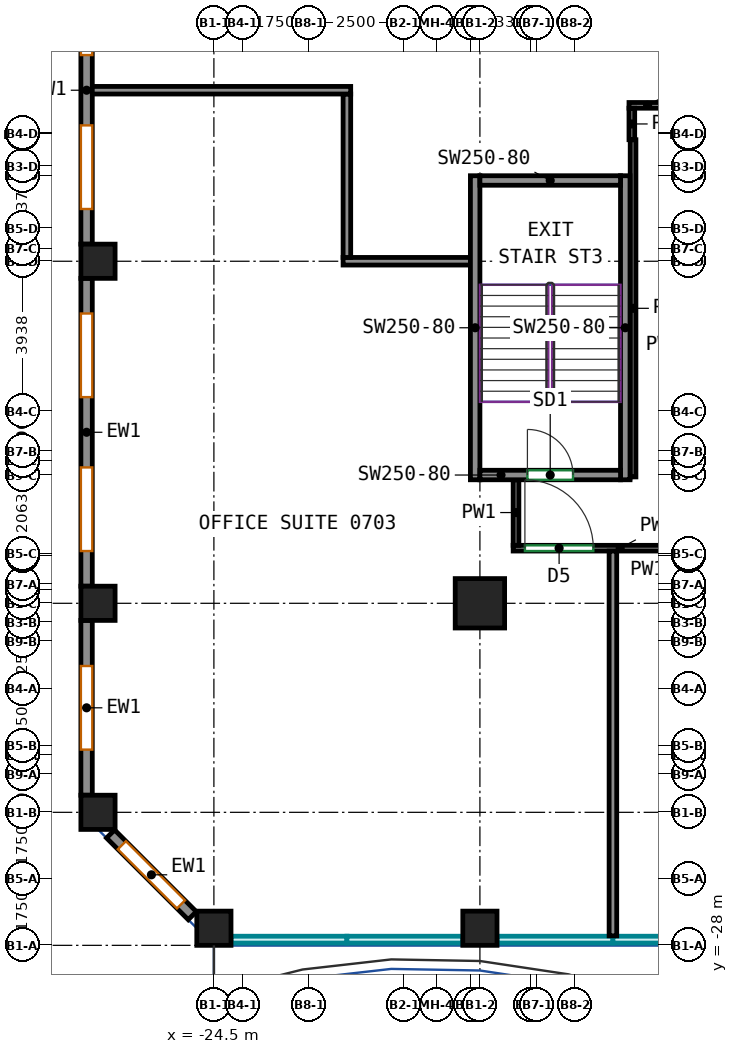
"""IFC4 building model, lengths in metres.
Left out: names, types, materials, properties, quantities, classifications, styles, units other than length and angle.
Written with IfcOpenShell. Run it as: python <this file> out.ifc"""

import sys

from ifc_helpers import new_model, si_unit, direction, frame, frame_2d, origin, origin_2d, place, context, subcontext, project, spatial, rectangle, extrude, source, transform, mapped, element, fill, save


model = new_model("IFC4")
c1 = context("Model", 3, precision=1e-05, world=origin(), true_north=direction((0.0, 1.0)))
c2 = subcontext(c1, "Body", "Model", "MODEL_VIEW")
j1 = project(units=[si_unit("LENGTHUNIT", "METRE"), si_unit("PLANEANGLEUNIT", "RADIAN")], contexts=[c1])
p1 = place(None, origin())
s1 = spatial("IfcSite", under=j1, at=p1, CompositionType="ELEMENT")
p2 = place(p1, origin())
s2 = spatial("IfcBuilding", under=s1, at=p2, CompositionType="ELEMENT")
p3 = place(p2, frame((0.0, 0.0, 35.0)))
s3 = spatial("IfcBuildingStorey", under=s2, at=p3, CompositionType="ELEMENT", Elevation=35.0)
m1 = source(origin(), c2, "Body", "SweptSolid", [
    extrude(rectangle(XDim=0.9, YDim=0.9, at=origin_2d()), origin(), (0.0, 0.0, 1.0), 3.72),
])
for number, where, z_axis, x_axis in (
    (1, (-27.55, -24.5, 0.0), (0.0, 0.0, 1.0), (1.0, 0.0, 0.0)),
    (2, (-27.55, -19.0, 0.0), (0.0, 0.0, 1.0), (1.0, 0.0, 0.0)),
    (3, (-27.55, -10.0, 0.0), (0.0, 0.0, 1.0), (1.0, 0.0, 0.0)),
    (4, (-24.5, -27.55, 0.0), (0.0, 0.0, 1.0), (1.0, 0.0, 0.0)),
    (5, (-17.5, -27.55, 0.0), (0.0, 0.0, 1.0), (1.0, 0.0, 0.0)),
):
    element("IfcColumn", number, at=place(p3, frame(where, z_axis=z_axis, x_axis=x_axis)), inside=s3, PredefinedType="COLUMN", context=c2, shape_type="MappedRepresentation", body=[
        mapped(m1, transform((0.0, 0.0, 0.0))),
    ])
m2 = source(origin(), c2, "Body", "SweptSolid", [
    extrude(rectangle(XDim=1.3, YDim=1.3, at=origin_2d()), origin(), (0.0, 0.0, 1.0), 3.72),
])
p4 = place(p3, frame((-17.5, -19.0, 0.0), z_axis=(0.0, 0.0, 1.0), x_axis=(1.0, 0.0, 0.0)))
e6 = element("IfcColumn", 6, at=p4, inside=s3, PredefinedType="COLUMN", context=c2, shape_type="MappedRepresentation", body=[
    mapped(m2, transform((0.0, 0.0, 0.0))),
])
m3 = source(origin(), c2, "Body", "SweptSolid", [
    extrude(rectangle(XDim=8.0, YDim=0.25, at=frame_2d((4.0, 0.0))), origin(), (0.0, 0.0, 1.0), 3.72),
])
for number, where, z_axis, x_axis in (
    (7, (-17.625, -15.75, 0.0), (0.0, 0.0, 1.0), (0.0, 1.0, 0.0)),
    (8, (-13.675, -15.75, 0.0), (0.0, 0.0, 1.0), (0.0, 1.0, 0.0)),
):
    element("IfcWall", number, at=place(p3, frame(where, z_axis=z_axis, x_axis=x_axis)), inside=s3, PredefinedType="SHEAR", context=c2, shape_type="MappedRepresentation", body=[
        mapped(m3, transform((0.0, 0.0, 0.0))),
    ])
m4 = source(origin(), c2, "Body", "SweptSolid", [
    extrude(rectangle(XDim=3.7, YDim=0.25, at=frame_2d((1.85, 0.0))), origin(), (0.0, 0.0, 1.0), 3.72),
])
p5 = place(p3, frame((-17.5, -15.625, 0.0), z_axis=(0.0, 0.0, 1.0), x_axis=(1.0, 0.0, 0.0)))
e9 = element("IfcWall", 9, at=p5, inside=s3, PredefinedType="SHEAR", context=c2, shape_type="MappedRepresentation", body=[
    mapped(m4, transform((0.0, 0.0, 0.0))),
])
p6 = place(p5, frame((1.25, 0.0, 0.0)))
e10 = element("IfcOpeningElement", 10, at=p6, cuts=e9, PredefinedType="OPENING", context=c2, shape_type="SweptSolid", body=[
    extrude(rectangle(XDim=1.2, YDim=2.1, at=frame_2d((0.6, 1.05))), frame((0.0, 0.135, 0.0), z_axis=(0.0, -1.0, 0.0), x_axis=(1.0, 0.0, 0.0)), (0.0, 0.0, 1.0), 0.27),
])
p7 = place(p3, frame((-17.5, -7.875, 0.0), z_axis=(0.0, 0.0, 1.0), x_axis=(1.0, 0.0, 0.0)))
e11 = element("IfcWall", 11, at=p7, inside=s3, PredefinedType="SHEAR", context=c2, shape_type="MappedRepresentation", body=[
    mapped(m4, transform((0.0, 0.0, 0.0))),
])
m5 = source(origin(), c2, "Body", "SweptSolid", [
    extrude(rectangle(XDim=8.1, YDim=0.3, at=frame_2d((4.05, 0.0))), origin(), (0.0, 0.0, 1.0), 3.72),
])
p8 = place(p3, frame((-27.85, -1.45, 0.0), z_axis=(0.0, 0.0, 1.0), x_axis=(0.0, -1.0, 0.0)))
e12 = element("IfcWall", 12, at=p8, inside=s3, PredefinedType="SOLIDWALL", context=c2, shape_type="MappedRepresentation", body=[
    mapped(m5, transform((0.0, 0.0, 0.0))),
])
p9 = place(p8, frame((0.925, 0.0, 0.7)))
e13 = element("IfcOpeningElement", 13, at=p9, cuts=e12, PredefinedType="OPENING", context=c2, shape_type="SweptSolid", body=[
    extrude(rectangle(XDim=2.2, YDim=2.25, at=frame_2d((1.1, 1.125))), frame((0.0, 0.16, 0.0), z_axis=(0.0, -1.0, 0.0), x_axis=(1.0, 0.0, 0.0)), (0.0, 0.0, 1.0), 0.32),
])
p10 = place(p8, frame((4.975, 0.0, 0.7)))
e14 = element("IfcOpeningElement", 14, at=p10, cuts=e12, PredefinedType="OPENING", context=c2, shape_type="SweptSolid", body=[
    extrude(rectangle(XDim=2.2, YDim=2.25, at=frame_2d((1.1, 1.125))), frame((0.0, 0.16, 0.0), z_axis=(0.0, -1.0, 0.0), x_axis=(1.0, 0.0, 0.0)), (0.0, 0.0, 1.0), 0.32),
])
p11 = place(p3, frame((-27.85, -10.45, 0.0), z_axis=(0.0, 0.0, 1.0), x_axis=(0.0, -1.0, 0.0)))
e15 = element("IfcWall", 15, at=p11, inside=s3, PredefinedType="SOLIDWALL", context=c2, shape_type="MappedRepresentation", body=[
    mapped(m5, transform((0.0, 0.0, 0.0))),
])
p12 = place(p11, frame((0.925, 0.0, 0.7)))
e16 = element("IfcOpeningElement", 16, at=p12, cuts=e15, PredefinedType="OPENING", context=c2, shape_type="SweptSolid", body=[
    extrude(rectangle(XDim=2.2, YDim=2.25, at=frame_2d((1.1, 1.125))), frame((0.0, 0.16, 0.0), z_axis=(0.0, -1.0, 0.0), x_axis=(1.0, 0.0, 0.0)), (0.0, 0.0, 1.0), 0.32),
])
p13 = place(p11, frame((4.975, 0.0, 0.7)))
e17 = element("IfcOpeningElement", 17, at=p13, cuts=e15, PredefinedType="OPENING", context=c2, shape_type="SweptSolid", body=[
    extrude(rectangle(XDim=2.2, YDim=2.25, at=frame_2d((1.1, 1.125))), frame((0.0, 0.16, 0.0), z_axis=(0.0, -1.0, 0.0), x_axis=(1.0, 0.0, 0.0)), (0.0, 0.0, 1.0), 0.32),
])
m6 = source(origin(), c2, "Body", "SweptSolid", [
    extrude(rectangle(XDim=4.6, YDim=0.3, at=frame_2d((2.3, 0.0))), origin(), (0.0, 0.0, 1.0), 3.72),
])
p14 = place(p3, frame((-27.85, -19.45, 0.0), z_axis=(0.0, 0.0, 1.0), x_axis=(0.0, -1.0, 0.0)))
e18 = element("IfcWall", 18, at=p14, inside=s3, PredefinedType="SOLIDWALL", context=c2, shape_type="MappedRepresentation", body=[
    mapped(m6, transform((0.0, 0.0, 0.0))),
])
p15 = place(p14, frame((1.2, 0.0, 0.7)))
e19 = element("IfcOpeningElement", 19, at=p15, cuts=e18, PredefinedType="OPENING", context=c2, shape_type="SweptSolid", body=[
    extrude(rectangle(XDim=2.2, YDim=2.25, at=frame_2d((1.1, 1.125))), frame((0.0, 0.16, 0.0), z_axis=(0.0, -1.0, 0.0), x_axis=(1.0, 0.0, 0.0)), (0.0, 0.0, 1.0), 0.32),
])
m7 = source(origin(), c2, "Body", "SweptSolid", [
    extrude(rectangle(XDim=3.041, YDim=0.3, at=frame_2d((1.521, 0.0))), origin(), (0.0, 0.0, 1.0), 3.72),
])
p16 = place(p3, frame((-27.219, -25.069, 0.0), z_axis=(0.0, 0.0, 1.0), x_axis=(0.707106781187, -0.707106781187, 0.0)))
e20 = element("IfcWall", 20, at=p16, inside=s3, PredefinedType="SOLIDWALL", context=c2, shape_type="MappedRepresentation", body=[
    mapped(m7, transform((0.0, 0.0, 0.0))),
])
p17 = place(p16, frame((0.42, 0.0, 0.7)))
e21 = element("IfcOpeningElement", 21, at=p17, cuts=e20, PredefinedType="OPENING", context=c2, shape_type="SweptSolid", body=[
    extrude(rectangle(XDim=2.2, YDim=2.25, at=frame_2d((1.1, 1.125))), frame((0.0, 0.16, 0.0), z_axis=(0.0, -1.0, 0.0), x_axis=(1.0, 0.0, 0.0)), (0.0, 0.0, 1.0), 0.32),
])
p18 = place(p3, frame((-12.598, -5.898, 0.0), z_axis=(0.0, 0.0, 1.0), x_axis=(-1.0, 0.0, 0.0)))
e22 = element("IfcWall", 22, at=p18, inside=s3, PredefinedType="PARTITIONING", context=c2, shape_type="SweptSolid", body=[
    extrude(rectangle(XDim=0.979, YDim=0.15, at=frame_2d((0.49, 0.0))), origin(), (0.0, 0.0, 1.0), 3.72),
])
p19 = place(p3, frame((-13.47, -6.802, 0.0), z_axis=(0.0, 0.0, 1.0), x_axis=(0.0, -1.0, 0.0)))
e23 = element("IfcWall", 23, at=p19, inside=s3, PredefinedType="PARTITIONING", context=c2, shape_type="SweptSolid", body=[
    extrude(rectangle(XDim=8.873, YDim=0.15, at=frame_2d((4.437, 0.0))), origin(), (0.0, 0.0, 1.0), 3.72),
])
p20 = place(p3, frame((-13.502, -5.973, 0.0), z_axis=(0.0, 0.0, 1.0), x_axis=(0.0, -1.0, 0.0)))
e24 = element("IfcWall", 24, at=p20, inside=s3, PredefinedType="PARTITIONING", context=c2, shape_type="SweptSolid", body=[
    extrude(rectangle(XDim=0.829, YDim=0.15, at=frame_2d((0.415, 0.0))), origin(), (0.0, 0.0, 1.0), 3.72),
])
p21 = place(p3, frame((-16.625, -17.55, 0.0), z_axis=(0.0, 0.0, 1.0), x_axis=(1.0, 0.0, 0.0)))
e25 = element("IfcWall", 25, at=p21, inside=s3, PredefinedType="PARTITIONING", context=c2, shape_type="SweptSolid", body=[
    extrude(rectangle(XDim=4.023, YDim=0.15, at=frame_2d((2.011, 0.0))), origin(), (0.0, 0.0, 1.0), 3.72),
])
p22 = place(p21, frame((0.309, 0.0, 0.0)))
e26 = element("IfcOpeningElement", 26, at=p22, cuts=e25, PredefinedType="OPENING", context=c2, shape_type="SweptSolid", body=[
    extrude(rectangle(XDim=1.8, YDim=2.1, at=frame_2d((0.9, 1.05))), frame((0.0, 0.085, 0.0), z_axis=(0.0, -1.0, 0.0), x_axis=(1.0, 0.0, 0.0)), (0.0, 0.0, 1.0), 0.17),
])
p23 = place(p3, frame((-16.55, -15.75, 0.0), z_axis=(0.0, 0.0, 1.0), x_axis=(0.0, -1.0, 0.0)))
e27 = element("IfcWall", 27, at=p23, inside=s3, PredefinedType="PARTITIONING", context=c2, shape_type="SweptSolid", body=[
    extrude(rectangle(XDim=1.725, YDim=0.15, at=frame_2d((0.863, 0.0))), origin(), (0.0, 0.0, 1.0), 3.72),
])
p24 = place(p3, frame((-21.1, -10.0, 0.0), z_axis=(0.0, 0.0, 1.0), x_axis=(1.0, 0.0, 0.0)))
e28 = element("IfcWall", 28, at=p24, inside=s3, PredefinedType="PARTITIONING", context=c2, shape_type="SweptSolid", body=[
    extrude(rectangle(XDim=3.35, YDim=0.2, at=frame_2d((1.675, 0.0))), origin(), (0.0, 0.0, 1.0), 3.72),
])
p25 = place(p3, frame((-21.0, -9.9, 0.0), z_axis=(0.0, 0.0, 1.0), x_axis=(0.0, 1.0, 0.0)))
e29 = element("IfcWall", 29, at=p25, inside=s3, PredefinedType="PARTITIONING", context=c2, shape_type="SweptSolid", body=[
    extrude(rectangle(XDim=4.3, YDim=0.2, at=frame_2d((2.15, 0.0))), origin(), (0.0, 0.0, 1.0), 3.72),
])
p26 = place(p3, frame((-27.75, -5.5, 0.0), z_axis=(0.0, 0.0, 1.0), x_axis=(1.0, 0.0, 0.0)))
e30 = element("IfcWall", 30, at=p26, inside=s3, PredefinedType="PARTITIONING", context=c2, shape_type="SweptSolid", body=[
    extrude(rectangle(XDim=6.85, YDim=0.2, at=frame_2d((3.425, 0.0))), origin(), (0.0, 0.0, 1.0), 3.72),
])
p27 = place(p3, frame((-14.0, -27.75, 0.0), z_axis=(0.0, 0.0, 1.0), x_axis=(0.0, 1.0, 0.0)))
e31 = element("IfcWall", 31, at=p27, inside=s3, PredefinedType="PARTITIONING", context=c2, shape_type="SweptSolid", body=[
    extrude(rectangle(XDim=10.124, YDim=0.2, at=frame_2d((5.062, 0.0))), origin(), (0.0, 0.0, 1.0), 3.72),
])
p28 = place(p9, origin())
e32 = element("IfcWindow", 32, at=p28, inside=s3, PartitioningType="SINGLE_PANEL", PredefinedType="WINDOW", context=c2, shape_type="SweptSolid", body=[
    extrude(rectangle(XDim=2.2, YDim=2.25, at=frame_2d((1.1, 1.125))), frame((0.0, 0.03, 0.0), z_axis=(0.0, -1.0, 0.0), x_axis=(1.0, 0.0, 0.0)), (0.0, 0.0, 1.0), 0.06),
])
fill(e13, e32)
p29 = place(p10, origin())
e33 = element("IfcWindow", 33, at=p29, inside=s3, PartitioningType="SINGLE_PANEL", PredefinedType="WINDOW", context=c2, shape_type="SweptSolid", body=[
    extrude(rectangle(XDim=2.2, YDim=2.25, at=frame_2d((1.1, 1.125))), frame((0.0, 0.03, 0.0), z_axis=(0.0, -1.0, 0.0), x_axis=(1.0, 0.0, 0.0)), (0.0, 0.0, 1.0), 0.06),
])
fill(e14, e33)
p30 = place(p12, origin())
e34 = element("IfcWindow", 34, at=p30, inside=s3, PartitioningType="SINGLE_PANEL", PredefinedType="WINDOW", context=c2, shape_type="SweptSolid", body=[
    extrude(rectangle(XDim=2.2, YDim=2.25, at=frame_2d((1.1, 1.125))), frame((0.0, 0.03, 0.0), z_axis=(0.0, -1.0, 0.0), x_axis=(1.0, 0.0, 0.0)), (0.0, 0.0, 1.0), 0.06),
])
fill(e16, e34)
p31 = place(p13, origin())
e35 = element("IfcWindow", 35, at=p31, inside=s3, PartitioningType="SINGLE_PANEL", PredefinedType="WINDOW", context=c2, shape_type="SweptSolid", body=[
    extrude(rectangle(XDim=2.2, YDim=2.25, at=frame_2d((1.1, 1.125))), frame((0.0, 0.03, 0.0), z_axis=(0.0, -1.0, 0.0), x_axis=(1.0, 0.0, 0.0)), (0.0, 0.0, 1.0), 0.06),
])
fill(e17, e35)
p32 = place(p15, origin())
e36 = element("IfcWindow", 36, at=p32, inside=s3, PartitioningType="SINGLE_PANEL", PredefinedType="WINDOW", context=c2, shape_type="SweptSolid", body=[
    extrude(rectangle(XDim=2.2, YDim=2.25, at=frame_2d((1.1, 1.125))), frame((0.0, 0.03, 0.0), z_axis=(0.0, -1.0, 0.0), x_axis=(1.0, 0.0, 0.0)), (0.0, 0.0, 1.0), 0.06),
])
fill(e19, e36)
p33 = place(p17, origin())
e37 = element("IfcWindow", 37, at=p33, inside=s3, PartitioningType="SINGLE_PANEL", PredefinedType="WINDOW", context=c2, shape_type="SweptSolid", body=[
    extrude(rectangle(XDim=2.2, YDim=2.25, at=frame_2d((1.1, 1.125))), frame((0.0, 0.03, 0.0), z_axis=(0.0, -1.0, 0.0), x_axis=(1.0, 0.0, 0.0)), (0.0, 0.0, 1.0), 0.06),
])
fill(e21, e37)
p34 = place(p6, origin())
e38 = element("IfcDoor", 38, at=p34, inside=s3, OperationType="DOUBLE_DOOR_SINGLE_SWING", PredefinedType="DOOR", context=c2, shape_type="SweptSolid", body=[
    extrude(rectangle(XDim=1.2, YDim=2.1, at=frame_2d((0.6, 1.05))), frame((0.0, 0.025, 0.0), z_axis=(0.0, -1.0, 0.0), x_axis=(1.0, 0.0, 0.0)), (0.0, 0.0, 1.0), 0.05),
])
fill(e10, e38)
p35 = place(p22, origin())
e39 = element("IfcDoor", 39, at=p35, inside=s3, OperationType="DOUBLE_DOOR_SINGLE_SWING", PredefinedType="DOOR", context=c2, shape_type="SweptSolid", body=[
    extrude(rectangle(XDim=1.8, YDim=2.1, at=frame_2d((0.9, 1.05))), frame((0.0, 0.025, 0.0), z_axis=(0.0, -1.0, 0.0), x_axis=(1.0, 0.0, 0.0)), (0.0, 0.0, 1.0), 0.05),
])
fill(e26, e39)
save(model, sys.argv[1])
